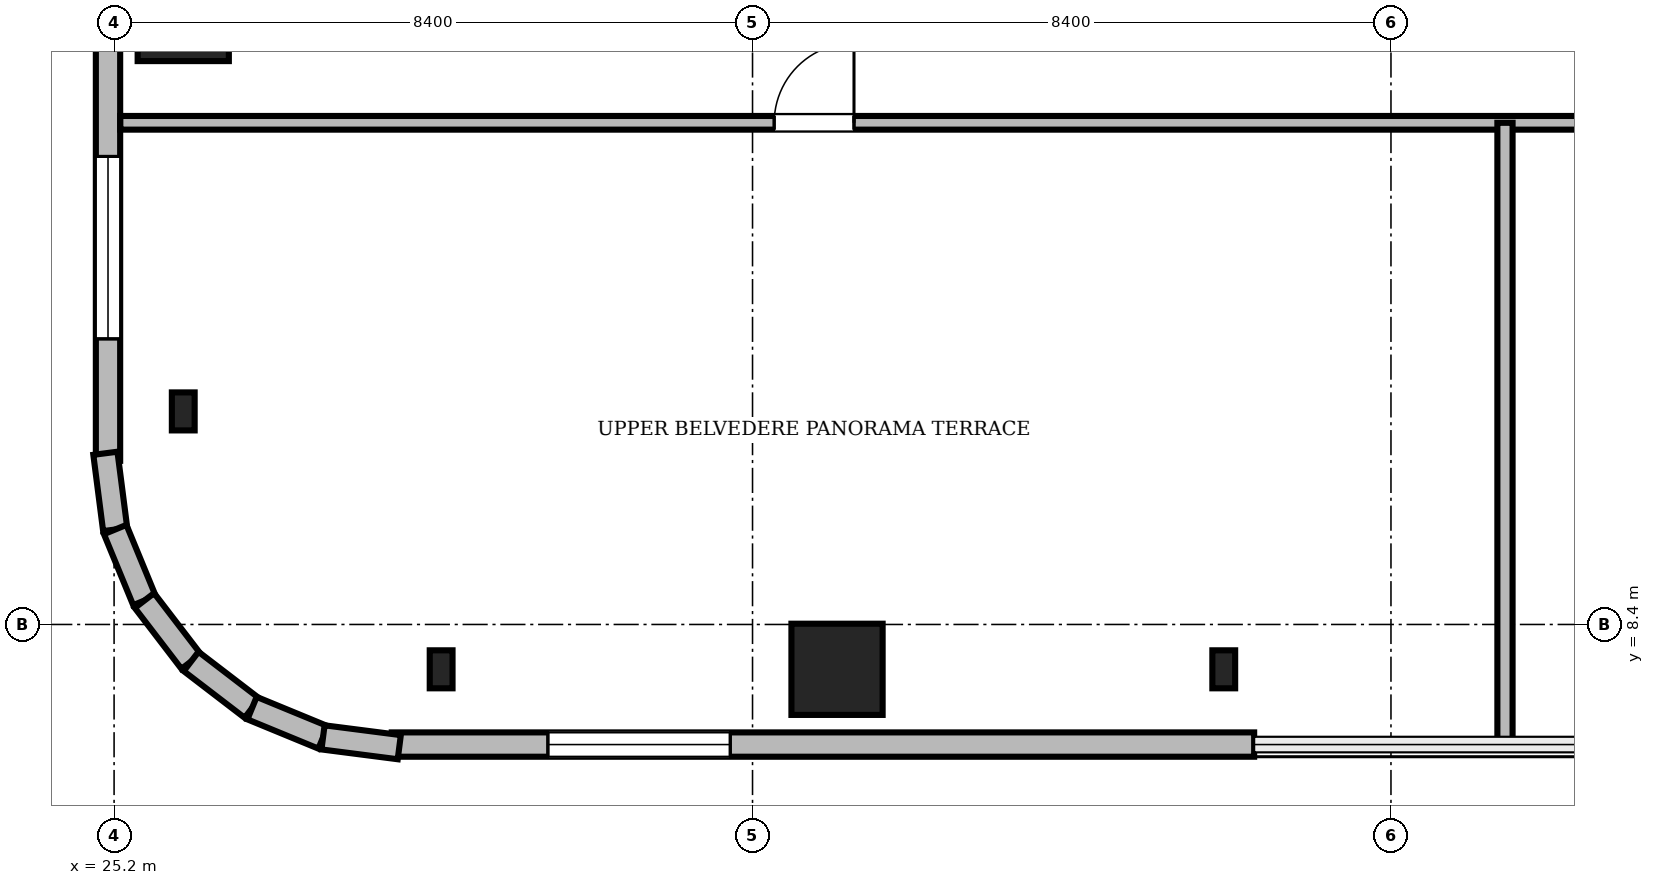
"""IFC4 building model, lengths in metres.
Left out: names, types, materials, properties, quantities, classifications, styles, units other than length and angle.
Written with IfcOpenShell. Run it as: python <this file> out.ifc"""

import sys

from ifc_helpers import new_model, si_unit, direction, frame, frame_2d, origin, origin_2d, place, context, subcontext, project, spatial, rectangle, i_section, extrude, source, transform, mapped, element, fill, save


model = new_model("IFC4")
c1 = context("Model", 3, precision=1e-05, world=origin(), true_north=direction((0.0, 1.0)))
c2 = subcontext(c1, "Body", "Model", "MODEL_VIEW")
j1 = project(units=[si_unit("LENGTHUNIT", "METRE"), si_unit("PLANEANGLEUNIT", "RADIAN")], contexts=[c1])
p1 = place(None, origin())
s1 = spatial("IfcSite", under=j1, at=p1, CompositionType="ELEMENT")
p2 = place(p1, origin())
s2 = spatial("IfcBuilding", under=s1, at=p2, CompositionType="ELEMENT")
p3 = place(p2, frame((0.0, 0.0, 291.15)))
s3 = spatial("IfcBuildingStorey", under=s2, at=p3, CompositionType="ELEMENT", Elevation=291.15)
m1 = source(origin(), c2, "Body", "SweptSolid", [
    extrude(rectangle(XDim=1.2, YDim=1.2, at=origin_2d()), origin(), (0.0, 0.0, 1.0), 4.738),
])
for number, where, z_axis, x_axis in (
    (1, (34.712, 7.81, 0.0), (0.054, 0.114, 0.992), (-0.904, 0.428, 0.0)),
    (2, (26.11, 16.412, 0.0), (0.114, 0.054, 0.992), (-0.429, 0.903, 0.0)),
):
    element("IfcColumn", number, at=place(p3, frame(where, z_axis=z_axis, x_axis=x_axis)), inside=s3, PredefinedType="COLUMN", context=c2, shape_type="MappedRepresentation", body=[
        mapped(m1, transform((0.0, 0.0, 0.0), scale=1.0)),
    ])
m2 = source(origin(), c2, "Body", "SweptSolid", [
    extrude(i_section(OverallWidth=0.3, OverallDepth=0.5, WebThickness=0.014, FlangeThickness=0.028, FilletRadius=0.027, at=origin_2d()), origin(), (0.0, 0.0, 1.0), 4.75),
])
p4 = place(p3, frame((29.503, 7.81, 0.0), z_axis=(0.089888557106, 0.113684098524, 0.989442253517), x_axis=(-0.784419603895, 0.620230509589, 0.0)))
e3 = element("IfcColumn", 3, at=p4, inside=s3, PredefinedType="COLUMN", context=c2, shape_type="MappedRepresentation", body=[
    mapped(m2, transform((0.0, 0.0, 0.0), scale=1.0)),
])
m3 = source(origin(), c2, "Body", "SweptSolid", [
    extrude(i_section(OverallWidth=0.3, OverallDepth=0.5, WebThickness=0.014, FlangeThickness=0.028, FilletRadius=0.027, at=origin_2d()), origin(), (0.0, 0.0, 1.0), 4.731),
])
p5 = place(p3, frame((39.8, 7.81, 0.0), z_axis=(0.0, 0.114146181694, 0.993463964724), x_axis=(-1.0, 0.0, 0.0)))
e4 = element("IfcColumn", 4, at=p5, inside=s3, PredefinedType="COLUMN", context=c2, shape_type="MappedRepresentation", body=[
    mapped(m3, transform((0.0, 0.0, 0.0), scale=1.0)),
])
p6 = place(p3, frame((26.11, 11.203, 0.0), z_axis=(0.113633368044, 0.089889082184, 0.989448033285), x_axis=(-0.620403072684, 0.784283129619, 0.0)))
e5 = element("IfcColumn", 5, at=p6, inside=s3, PredefinedType="COLUMN", context=c2, shape_type="MappedRepresentation", body=[
    mapped(m2, transform((0.0, 0.0, 0.0), scale=1.0)),
])
m4 = source(origin(), c2, "Body", "SweptSolid", [
    extrude(rectangle(XDim=11.347, YDim=0.32, at=frame_2d((5.673, 0.0))), origin(), (0.0, 0.0, 1.0), 4.7),
])
p7 = place(p3, frame((28.853, 6.82, 0.0), z_axis=(0.0, 0.0, 1.0), x_axis=(1.0, 0.0, 0.0)))
e6 = element("IfcWall", 6, at=p7, inside=s3, PredefinedType="SOLIDWALL", context=c2, shape_type="MappedRepresentation", body=[
    mapped(m4, transform((0.0, 0.0, 0.0), scale=1.0)),
])
m5 = source(origin(), c2, "Body", "SweptSolid", [
    extrude(rectangle(XDim=2.4, YDim=3.2, at=frame_2d((1.2, 1.6))), frame((0.0, 0.17, 0.0), z_axis=(0.0, -1.0, 0.0), x_axis=(1.0, 0.0, 0.0)), (0.0, 0.0, 1.0), 0.34),
])
p8 = place(p7, frame((2.054, 0.0, 0.72)))
e7 = element("IfcOpeningElement", 7, at=p8, cuts=e6, PredefinedType="OPENING", context=c2, shape_type="MappedRepresentation", body=[
    mapped(m5, transform((0.0, 0.0, 0.0), scale=1.0)),
])
p9 = place(p3, frame((25.12, 21.9, 0.0), z_axis=(0.0, 0.0, 1.0), x_axis=(0.0, -1.0, 0.0)))
e8 = element("IfcWall", 8, at=p9, inside=s3, PredefinedType="SOLIDWALL", context=c2, shape_type="MappedRepresentation", body=[
    mapped(m4, transform((0.0, 0.0, 0.0), scale=1.0)),
])
p10 = place(p9, frame((7.343, 0.0, 0.72)))
e9 = element("IfcOpeningElement", 9, at=p10, cuts=e8, PredefinedType="OPENING", context=c2, shape_type="MappedRepresentation", body=[
    mapped(m5, transform((0.0, 0.0, 0.0), scale=1.0)),
])
m6 = source(origin(), c2, "Body", "SweptSolid", [
    extrude(rectangle(XDim=1.011, YDim=0.32, at=frame_2d((0.506, 0.0))), origin(), (0.0, 0.0, 1.0), 4.7),
])
p11 = place(p3, frame((25.085, 10.652, 0.0), z_axis=(0.0, 0.0, 1.0), x_axis=(0.127718532165, -0.991810453938, 0.0)))
e10 = element("IfcWall", 10, at=p11, inside=s3, PredefinedType="SOLIDWALL", context=c2, shape_type="MappedRepresentation", body=[
    mapped(m6, transform((0.0, 0.0, 0.0), scale=1.0)),
])
m7 = source(origin(), c2, "Body", "SweptSolid", [
    extrude(rectangle(XDim=1.01, YDim=0.32, at=frame_2d((0.505, 0.0))), origin(), (0.0, 0.0, 1.0), 4.7),
])
p12 = place(p3, frame((25.215, 9.649, 0.0), z_axis=(0.0, 0.0, 1.0), x_axis=(0.380786261757, -0.924663086133, 0.0)))
e11 = element("IfcWall", 11, at=p12, inside=s3, PredefinedType="SOLIDWALL", context=c2, shape_type="MappedRepresentation", body=[
    mapped(m7, transform((0.0, 0.0, 0.0), scale=1.0)),
])
m8 = source(origin(), c2, "Body", "SweptSolid", [
    extrude(rectangle(XDim=1.01, YDim=0.32, at=frame_2d((0.505, 0.0))), origin(), (0.0, 0.0, 1.0), 4.7),
])
for number, where, z_axis, x_axis in (
    (12, (25.599, 8.715, 0.0), (0.0, 0.0, 1.0), (0.608, -0.794, 0.0)),
    (13, (26.213, 7.913, 0.0), (0.0, 0.0, 1.0), (0.794, -0.608, 0.0)),
):
    element("IfcWall", number, at=place(p3, frame(where, z_axis=z_axis, x_axis=x_axis)), inside=s3, PredefinedType="SOLIDWALL", context=c2, shape_type="MappedRepresentation", body=[
        mapped(m8, transform((0.0, 0.0, 0.0), scale=1.0)),
    ])
m9 = source(origin(), c2, "Body", "SweptSolid", [
    extrude(rectangle(XDim=1.01, YDim=0.32, at=frame_2d((0.505, 0.0))), origin(), (0.0, 0.0, 1.0), 4.7),
])
p13 = place(p3, frame((27.015, 7.299, 0.0), z_axis=(0.0, 0.0, 1.0), x_axis=(0.92462804056, -0.380871351783, 0.0)))
e14 = element("IfcWall", 14, at=p13, inside=s3, PredefinedType="SOLIDWALL", context=c2, shape_type="MappedRepresentation", body=[
    mapped(m9, transform((0.0, 0.0, 0.0), scale=1.0)),
])
m10 = source(origin(), c2, "Body", "SweptSolid", [
    extrude(rectangle(XDim=1.011, YDim=0.32, at=frame_2d((0.506, 0.0))), origin(), (0.0, 0.0, 1.0), 4.7),
])
p14 = place(p3, frame((27.949, 6.915, 0.0), z_axis=(0.0, 0.0, 1.0), x_axis=(0.991844931851, -0.12745050475, 0.0)))
e15 = element("IfcWall", 15, at=p14, inside=s3, PredefinedType="SOLIDWALL", context=c2, shape_type="MappedRepresentation", body=[
    mapped(m10, transform((0.0, 0.0, 0.0), scale=1.0)),
])
m11 = source(origin(), c2, "Body", "SweptSolid", [
    extrude(rectangle(XDim=25.018, YDim=0.18, at=frame_2d((12.509, 0.0))), origin(), (0.0, 0.0, 1.0), 3.942),
])
p15 = place(p3, frame((25.282, 15.0, 0.0), z_axis=(0.0, 0.0, 1.0), x_axis=(1.0, 0.0, 0.0)))
e16 = element("IfcWall", 16, at=p15, inside=s3, PredefinedType="PARTITIONING", context=c2, shape_type="MappedRepresentation", body=[
    mapped(m11, transform((0.0, 0.0, 0.0), scale=1.0)),
])
m12 = source(origin(), c2, "Body", "SweptSolid", [
    extrude(rectangle(XDim=1.05, YDim=2.2, at=frame_2d((0.525, 1.1))), frame((0.0, 0.1, 0.0), z_axis=(0.0, -1.0, 0.0), x_axis=(1.0, 0.0, 0.0)), (0.0, 0.0, 1.0), 0.2),
])
p16 = place(p15, frame((8.603, 0.0, 0.0)))
e17 = element("IfcOpeningElement", 17, at=p16, cuts=e16, PredefinedType="OPENING", context=c2, shape_type="MappedRepresentation", body=[
    mapped(m12, transform((0.0, 0.0, 0.0), scale=1.0)),
])
p17 = place(p15, frame((23.768, 0.0, 0.0)))
e18 = element("IfcOpeningElement", 18, at=p17, cuts=e16, PredefinedType="OPENING", context=c2, shape_type="MappedRepresentation", body=[
    mapped(m12, transform((0.0, 0.0, 0.0), scale=1.0)),
])
m13 = source(origin(), c2, "Body", "SweptSolid", [
    extrude(rectangle(XDim=8.19, YDim=0.2, at=frame_2d((4.095, 0.0))), origin(), (0.0, 0.0, 1.0), 3.942),
])
p18 = place(p3, frame((43.5, 6.81, 0.0), z_axis=(0.0, 0.0, 1.0), x_axis=(0.0, 1.0, 0.0)))
e19 = element("IfcWall", 19, at=p18, inside=s3, PredefinedType="PARTITIONING", context=c2, shape_type="MappedRepresentation", body=[
    mapped(m13, transform((0.0, 0.0, 0.0), scale=1.0)),
])
m14 = source(origin(), c2, "Body", "SweptSolid", [
    extrude(rectangle(XDim=2.4, YDim=3.2, at=frame_2d((1.2, 1.6))), frame((0.0, 0.03, 0.0), z_axis=(0.0, -1.0, 0.0), x_axis=(1.0, 0.0, 0.0)), (0.0, 0.0, 1.0), 0.06),
])
p19 = place(p8, origin())
e20 = element("IfcWindow", 20, at=p19, inside=s3, PartitioningType="SINGLE_PANEL", PredefinedType="WINDOW", context=c2, shape_type="MappedRepresentation", body=[
    mapped(m14, transform((0.0, 0.0, 0.0), scale=1.0)),
])
fill(e7, e20)
p20 = place(p10, origin())
e21 = element("IfcWindow", 21, at=p20, inside=s3, PartitioningType="SINGLE_PANEL", PredefinedType="WINDOW", context=c2, shape_type="MappedRepresentation", body=[
    mapped(m14, transform((0.0, 0.0, 0.0), scale=1.0)),
])
fill(e9, e21)
m15 = source(origin(), c2, "Body", "SweptSolid", [
    extrude(rectangle(XDim=1.05, YDim=2.2, at=frame_2d((0.525, 1.1))), frame((0.0, 0.025, 0.0), z_axis=(0.0, -1.0, 0.0), x_axis=(1.0, 0.0, 0.0)), (0.0, 0.0, 1.0), 0.05),
])
p21 = place(p16, origin())
e22 = element("IfcDoor", 22, at=p21, inside=s3, OperationType="SINGLE_SWING_RIGHT", PredefinedType="DOOR", context=c2, shape_type="MappedRepresentation", body=[
    mapped(m15, transform((0.0, 0.0, 0.0), scale=1.0)),
])
fill(e17, e22)
save(model, sys.argv[1])
